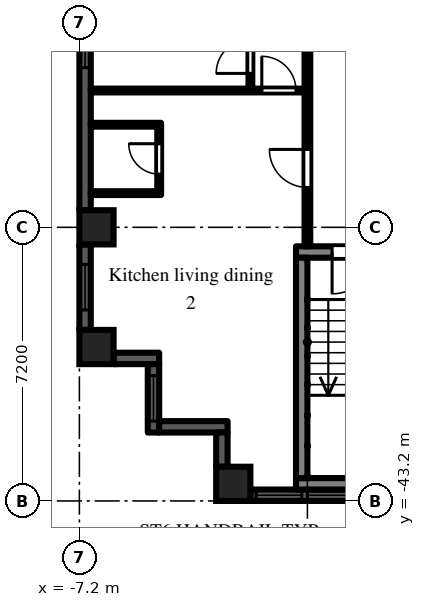
"""IFC4 building model, lengths in metres.
Left out: names, types, materials, properties, quantities, classifications, styles, units other than length and angle.
Written with IfcOpenShell. Run it as: python <this file> out.ifc"""

import sys

from ifc_helpers import new_model, si_unit, direction, frame, frame_2d, origin, origin_2d, place, context, subcontext, project, spatial, rectangle, extrude, element, fill, save


model = new_model("IFC4")
c1 = context("Model", 3, precision=1e-05, world=origin(), true_north=direction((0.0, 1.0)))
c2 = subcontext(c1, "Body", "Model", "MODEL_VIEW")
j1 = project(units=[si_unit("LENGTHUNIT", "METRE"), si_unit("PLANEANGLEUNIT", "RADIAN")], contexts=[c1])
p1 = place(None, origin())
s1 = spatial("IfcSite", under=j1, at=p1, CompositionType="ELEMENT")
p2 = place(p1, origin())
s2 = spatial("IfcBuilding", under=s1, at=p2, CompositionType="ELEMENT")
p3 = place(p2, frame((0.0, 0.0, 108.9)))
s3 = spatial("IfcBuildingStorey", under=s2, at=p3, CompositionType="ELEMENT", Elevation=108.9)
for number, where, z_axis, x_axis in (
    (1, (-6.75, -39.15, 0.0), (0.0, 0.0, 1.0), (1.0, 0.0, 0.0)),
    (2, (-6.75, -36.0, 0.0), (0.0, 0.0, 1.0), (1.0, 0.0, 0.0)),
    (3, (-3.15, -42.75, 0.0), (0.0, 0.0, 1.0), (1.0, 0.0, 0.0)),
):
    element("IfcColumn", number, at=place(p3, frame(where, z_axis=z_axis, x_axis=x_axis)), inside=s3, PredefinedType="COLUMN", context=c2, shape_type="SweptSolid", body=[
        extrude(rectangle(XDim=0.9, YDim=0.9, at=origin_2d()), origin(), (0.0, 0.0, 1.0), 3.0),
    ])
p4 = place(p3, frame((-7.05, -29.25, 0.0), z_axis=(0.0, 0.0, 1.0), x_axis=(0.0, -1.0, 0.0)))
e4 = element("IfcWall", 4, at=p4, inside=s3, PredefinedType="SOLIDWALL", context=c2, shape_type="SweptSolid", body=[
    extrude(rectangle(XDim=6.3, YDim=0.3, at=frame_2d((3.15, 0.0))), origin(), (0.0, 0.0, 1.0), 2.2),
])
p5 = place(p4, frame((0.15, 0.0, 0.2)))
e5 = element("IfcOpeningElement", 5, at=p5, cuts=e4, PredefinedType="OPENING", context=c2, shape_type="SweptSolid", body=[
    extrude(rectangle(XDim=2.4, YDim=1.85, at=frame_2d((1.2, 0.925))), frame((0.0, 0.16, 0.0), z_axis=(0.0, -1.0, 0.0), x_axis=(1.0, 0.0, 0.0)), (0.0, 0.0, 1.0), 0.32),
])
p6 = place(p3, frame((-7.05, -36.45, 0.0), z_axis=(0.0, 0.0, 1.0), x_axis=(0.0, -1.0, 0.0)))
e6 = element("IfcWall", 6, at=p6, inside=s3, PredefinedType="SOLIDWALL", context=c2, shape_type="SweptSolid", body=[
    extrude(rectangle(XDim=2.25, YDim=0.3, at=frame_2d((1.125, 0.0))), origin(), (0.0, 0.0, 1.0), 2.2),
])
p7 = place(p6, frame((0.525, 0.0, 0.2)))
e7 = element("IfcOpeningElement", 7, at=p7, cuts=e6, PredefinedType="OPENING", context=c2, shape_type="SweptSolid", body=[
    extrude(rectangle(XDim=1.2, YDim=1.85, at=frame_2d((0.6, 0.925))), frame((0.0, 0.16, 0.0), z_axis=(0.0, -1.0, 0.0), x_axis=(1.0, 0.0, 0.0)), (0.0, 0.0, 1.0), 0.32),
])
p8 = place(p3, frame((-6.3, -39.45, 0.0), z_axis=(0.0, 0.0, 1.0), x_axis=(1.0, 0.0, 0.0)))
e8 = element("IfcWall", 8, at=p8, inside=s3, PredefinedType="SOLIDWALL", context=c2, shape_type="SweptSolid", body=[
    extrude(rectangle(XDim=1.2, YDim=0.3, at=frame_2d((0.6, 0.0))), origin(), (0.0, 0.0, 1.0), 2.55),
])
p9 = place(p3, frame((-5.25, -39.6, 0.0), z_axis=(0.0, 0.0, 1.0), x_axis=(0.0, -1.0, 0.0)))
e9 = element("IfcWall", 9, at=p9, inside=s3, PredefinedType="SOLIDWALL", context=c2, shape_type="SweptSolid", body=[
    extrude(rectangle(XDim=1.8, YDim=0.3, at=frame_2d((0.9, 0.0))), origin(), (0.0, 0.0, 1.0), 2.55),
])
p10 = place(p9, frame((0.3, 0.0, 0.2)))
e10 = element("IfcOpeningElement", 10, at=p10, cuts=e9, PredefinedType="OPENING", context=c2, shape_type="SweptSolid", body=[
    extrude(rectangle(XDim=1.2, YDim=1.85, at=frame_2d((0.6, 0.925))), frame((0.0, 0.16, 0.0), z_axis=(0.0, -1.0, 0.0), x_axis=(1.0, 0.0, 0.0)), (0.0, 0.0, 1.0), 0.32),
])
p11 = place(p3, frame((-5.1, -41.25, 0.0), z_axis=(0.0, 0.0, 1.0), x_axis=(1.0, 0.0, 0.0)))
e11 = element("IfcWall", 11, at=p11, inside=s3, PredefinedType="SOLIDWALL", context=c2, shape_type="SweptSolid", body=[
    extrude(rectangle(XDim=1.8, YDim=0.3, at=frame_2d((0.9, 0.0))), origin(), (0.0, 0.0, 1.0), 2.55),
])
p12 = place(p3, frame((-3.45, -41.4, 0.0), z_axis=(0.0, 0.0, 1.0), x_axis=(0.0, -1.0, 0.0)))
e12 = element("IfcWall", 12, at=p12, inside=s3, PredefinedType="SOLIDWALL", context=c2, shape_type="SweptSolid", body=[
    extrude(rectangle(XDim=0.9, YDim=0.3, at=frame_2d((0.45, 0.0))), origin(), (0.0, 0.0, 1.0), 2.55),
])
p13 = place(p3, frame((-2.7, -43.05, 0.0), z_axis=(0.0, 0.0, 1.0), x_axis=(1.0, 0.0, 0.0)))
e13 = element("IfcWall", 13, at=p13, inside=s3, PredefinedType="SOLIDWALL", context=c2, shape_type="SweptSolid", body=[
    extrude(rectangle(XDim=5.4, YDim=0.3, at=frame_2d((2.7, 0.0))), origin(), (0.0, 0.0, 1.0), 2.2),
])
p14 = place(p13, frame((1.5, 0.0, 0.2)))
e14 = element("IfcOpeningElement", 14, at=p14, cuts=e13, PredefinedType="OPENING", context=c2, shape_type="SweptSolid", body=[
    extrude(rectangle(XDim=2.4, YDim=1.85, at=frame_2d((1.2, 0.925))), frame((0.0, 0.16, 0.0), z_axis=(0.0, -1.0, 0.0), x_axis=(1.0, 0.0, 0.0)), (0.0, 0.0, 1.0), 0.32),
])
p15 = place(p13, frame((0.15, 0.0, 0.2)))
e15 = element("IfcOpeningElement", 15, at=p15, cuts=e13, PredefinedType="OPENING", context=c2, shape_type="SweptSolid", body=[
    extrude(rectangle(XDim=1.2, YDim=1.85, at=frame_2d((0.6, 0.925))), frame((0.0, 0.16, 0.0), z_axis=(0.0, -1.0, 0.0), x_axis=(1.0, 0.0, 0.0)), (0.0, 0.0, 1.0), 0.32),
])
p16 = place(p13, frame((4.05, 0.0, 0.2)))
e16 = element("IfcOpeningElement", 16, at=p16, cuts=e13, PredefinedType="OPENING", context=c2, shape_type="SweptSolid", body=[
    extrude(rectangle(XDim=1.2, YDim=1.85, at=frame_2d((0.6, 0.925))), frame((0.0, 0.16, 0.0), z_axis=(0.0, -1.0, 0.0), x_axis=(1.0, 0.0, 0.0)), (0.0, 0.0, 1.0), 0.32),
])
p17 = place(p3, frame((-1.5, -36.65, 0.0), z_axis=(0.0, 0.0, 1.0), x_axis=(1.0, 0.0, 0.0)))
e17 = element("IfcWall", 17, at=p17, inside=s3, PredefinedType="SHEAR", context=c2, shape_type="SweptSolid", body=[
    extrude(rectangle(XDim=3.0, YDim=0.3, at=frame_2d((1.5, 0.0))), origin(), (0.0, 0.0, 1.0), 2.55),
])
p18 = place(p17, frame((0.95, 0.0, 0.0)))
e18 = element("IfcOpeningElement", 18, at=p18, cuts=e17, PredefinedType="OPENING", context=c2, shape_type="SweptSolid", body=[
    extrude(rectangle(XDim=1.1, YDim=2.1, at=frame_2d((0.55, 1.05))), frame((0.0, 0.16, 0.0), z_axis=(0.0, -1.0, 0.0), x_axis=(1.0, 0.0, 0.0)), (0.0, 0.0, 1.0), 0.32),
])
p19 = place(p3, frame((-1.5, -42.75, 0.0), z_axis=(0.0, 0.0, 1.0), x_axis=(1.0, 0.0, 0.0)))
e19 = element("IfcWall", 19, at=p19, inside=s3, PredefinedType="SHEAR", context=c2, shape_type="SweptSolid", body=[
    extrude(rectangle(XDim=3.0, YDim=0.3, at=frame_2d((1.5, 0.0))), origin(), (0.0, 0.0, 1.0), 2.55),
])
p20 = place(p3, frame((-1.35, -36.8, 0.0), z_axis=(0.0, 0.0, 1.0), x_axis=(0.0, -1.0, 0.0)))
e20 = element("IfcWall", 20, at=p20, inside=s3, PredefinedType="SHEAR", context=c2, shape_type="SweptSolid", body=[
    extrude(rectangle(XDim=5.8, YDim=0.3, at=frame_2d((2.9, 0.0))), origin(), (0.0, 0.0, 1.0), 2.55),
])
for number, where, z_axis, x_axis in (
    (21, (-6.9, -35.1, 0.0), (0.0, 0.0, 1.0), (1.0, 0.0, 0.0)),
    (22, (-6.9, -33.3, 0.0), (0.0, 0.0, 1.0), (1.0, 0.0, 0.0)),
):
    element("IfcWall", number, at=place(p3, frame(where, z_axis=z_axis, x_axis=x_axis)), inside=s3, PredefinedType="PARTITIONING", context=c2, shape_type="SweptSolid", body=[
        extrude(rectangle(XDim=1.85, YDim=0.1, at=frame_2d((0.925, 0.0))), origin(), (0.0, 0.0, 1.0), 2.55),
    ])
p21 = place(p3, frame((-6.9, -32.4, 0.0), z_axis=(0.0, 0.0, 1.0), x_axis=(1.0, 0.0, 0.0)))
e23 = element("IfcWall", 23, at=p21, inside=s3, PredefinedType="PARTITIONING", context=c2, shape_type="SweptSolid", body=[
    extrude(rectangle(XDim=5.625, YDim=0.1, at=frame_2d((2.812, 0.0))), origin(), (0.0, 0.0, 1.0), 2.55),
])
p22 = place(p21, frame((4.5, 0.0, 0.0)))
e24 = element("IfcOpeningElement", 24, at=p22, cuts=e23, PredefinedType="OPENING", context=c2, shape_type="SweptSolid", body=[
    extrude(rectangle(XDim=0.9, YDim=2.1, at=frame_2d((0.45, 1.05))), frame((0.0, 0.06, 0.0), z_axis=(0.0, -1.0, 0.0), x_axis=(1.0, 0.0, 0.0)), (0.0, 0.0, 1.0), 0.12),
])
p23 = place(p3, frame((-5.1, -35.05, 0.0), z_axis=(0.0, 0.0, 1.0), x_axis=(0.0, 1.0, 0.0)))
e25 = element("IfcWall", 25, at=p23, inside=s3, PredefinedType="PARTITIONING", context=c2, shape_type="SweptSolid", body=[
    extrude(rectangle(XDim=1.7, YDim=0.1, at=frame_2d((0.85, 0.0))), origin(), (0.0, 0.0, 1.0), 2.55),
])
p24 = place(p23, frame((0.45, 0.0, 0.0)))
e26 = element("IfcOpeningElement", 26, at=p24, cuts=e25, PredefinedType="OPENING", context=c2, shape_type="SweptSolid", body=[
    extrude(rectangle(XDim=0.8, YDim=2.1, at=frame_2d((0.4, 1.05))), frame((0.0, 0.06, 0.0), z_axis=(0.0, -1.0, 0.0), x_axis=(1.0, 0.0, 0.0)), (0.0, 0.0, 1.0), 0.12),
])
p25 = place(p3, frame((-2.7, -32.35, 0.0), z_axis=(0.0, 0.0, 1.0), x_axis=(0.0, 1.0, 0.0)))
e27 = element("IfcWall", 27, at=p25, inside=s3, PredefinedType="PARTITIONING", context=c2, shape_type="SweptSolid", body=[
    extrude(rectangle(XDim=14.275, YDim=0.1, at=frame_2d((7.138, 0.0))), origin(), (0.0, 0.0, 1.0), 2.55),
])
p26 = place(p25, frame((0.4, 0.0, 0.0)))
e28 = element("IfcOpeningElement", 28, at=p26, cuts=e27, PredefinedType="OPENING", context=c2, shape_type="SweptSolid", body=[
    extrude(rectangle(XDim=0.9, YDim=2.1, at=frame_2d((0.45, 1.05))), frame((0.0, 0.06, 0.0), z_axis=(0.0, -1.0, 0.0), x_axis=(1.0, 0.0, 0.0)), (0.0, 0.0, 1.0), 0.12),
])
p27 = place(p25, frame((5.8, 0.0, 0.0)))
e29 = element("IfcOpeningElement", 29, at=p27, cuts=e27, PredefinedType="OPENING", context=c2, shape_type="SweptSolid", body=[
    extrude(rectangle(XDim=0.9, YDim=2.1, at=frame_2d((0.45, 1.05))), frame((0.0, 0.06, 0.0), z_axis=(0.0, -1.0, 0.0), x_axis=(1.0, 0.0, 0.0)), (0.0, 0.0, 1.0), 0.12),
])
p28 = place(p25, frame((7.6, 0.0, 0.0)))
e30 = element("IfcOpeningElement", 30, at=p28, cuts=e27, PredefinedType="OPENING", context=c2, shape_type="SweptSolid", body=[
    extrude(rectangle(XDim=0.9, YDim=2.1, at=frame_2d((0.45, 1.05))), frame((0.0, 0.06, 0.0), z_axis=(0.0, -1.0, 0.0), x_axis=(1.0, 0.0, 0.0)), (0.0, 0.0, 1.0), 0.12),
])
p29 = place(p25, frame((13.0, 0.0, 0.0)))
e31 = element("IfcOpeningElement", 31, at=p29, cuts=e27, PredefinedType="OPENING", context=c2, shape_type="SweptSolid", body=[
    extrude(rectangle(XDim=0.9, YDim=2.1, at=frame_2d((0.45, 1.05))), frame((0.0, 0.06, 0.0), z_axis=(0.0, -1.0, 0.0), x_axis=(1.0, 0.0, 0.0)), (0.0, 0.0, 1.0), 0.12),
])
p30 = place(p3, frame((-1.2, -36.5, 0.0), z_axis=(0.0, 0.0, 1.0), x_axis=(0.0, 1.0, 0.0)))
e32 = element("IfcWall", 32, at=p30, inside=s3, PredefinedType="PARTITIONING", context=c2, shape_type="SweptSolid", body=[
    extrude(rectangle(XDim=35.225, YDim=0.15, at=frame_2d((17.613, 0.0))), origin(), (0.0, 0.0, 1.0), 2.55),
])
p31 = place(p30, frame((31.85, 0.0, 0.0)))
e33 = element("IfcOpeningElement", 33, at=p31, cuts=e32, PredefinedType="OPENING", context=c2, shape_type="SweptSolid", body=[
    extrude(rectangle(XDim=0.9, YDim=2.1, at=frame_2d((0.45, 1.05))), frame((0.0, 0.085, 0.0), z_axis=(0.0, -1.0, 0.0), x_axis=(1.0, 0.0, 0.0)), (0.0, 0.0, 1.0), 0.17),
])
p32 = place(p30, frame((27.05, 0.0, 0.0)))
e34 = element("IfcOpeningElement", 34, at=p32, cuts=e32, PredefinedType="OPENING", context=c2, shape_type="SweptSolid", body=[
    extrude(rectangle(XDim=0.9, YDim=2.1, at=frame_2d((0.45, 1.05))), frame((0.0, 0.085, 0.0), z_axis=(0.0, -1.0, 0.0), x_axis=(1.0, 0.0, 0.0)), (0.0, 0.0, 1.0), 0.17),
])
p33 = place(p30, frame((20.75, 0.0, 0.0)))
e35 = element("IfcOpeningElement", 35, at=p33, cuts=e32, PredefinedType="OPENING", context=c2, shape_type="SweptSolid", body=[
    extrude(rectangle(XDim=0.9, YDim=2.1, at=frame_2d((0.45, 1.05))), frame((0.0, 0.085, 0.0), z_axis=(0.0, -1.0, 0.0), x_axis=(1.0, 0.0, 0.0)), (0.0, 0.0, 1.0), 0.17),
])
p34 = place(p30, frame((18.95, 0.0, 0.0)))
e36 = element("IfcOpeningElement", 36, at=p34, cuts=e32, PredefinedType="OPENING", context=c2, shape_type="SweptSolid", body=[
    extrude(rectangle(XDim=0.9, YDim=2.1, at=frame_2d((0.45, 1.05))), frame((0.0, 0.085, 0.0), z_axis=(0.0, -1.0, 0.0), x_axis=(1.0, 0.0, 0.0)), (0.0, 0.0, 1.0), 0.17),
])
p35 = place(p30, frame((1.55, 0.0, 0.0)))
e37 = element("IfcOpeningElement", 37, at=p35, cuts=e32, PredefinedType="OPENING", context=c2, shape_type="SweptSolid", body=[
    extrude(rectangle(XDim=1.0, YDim=2.1, at=frame_2d((0.5, 1.05))), frame((0.0, 0.085, 0.0), z_axis=(0.0, -1.0, 0.0), x_axis=(1.0, 0.0, 0.0)), (0.0, 0.0, 1.0), 0.17),
])
p36 = place(p5, origin())
e38 = element("IfcWindow", 38, at=p36, inside=s3, PartitioningType="SINGLE_PANEL", PredefinedType="WINDOW", context=c2, shape_type="SweptSolid", body=[
    extrude(rectangle(XDim=2.4, YDim=1.85, at=frame_2d((1.2, 0.925))), frame((0.0, 0.03, 0.0), z_axis=(0.0, -1.0, 0.0), x_axis=(1.0, 0.0, 0.0)), (0.0, 0.0, 1.0), 0.06),
])
fill(e5, e38)
p37 = place(p7, origin())
e39 = element("IfcWindow", 39, at=p37, inside=s3, PartitioningType="SINGLE_PANEL", PredefinedType="WINDOW", context=c2, shape_type="SweptSolid", body=[
    extrude(rectangle(XDim=1.2, YDim=1.85, at=frame_2d((0.6, 0.925))), frame((0.0, 0.03, 0.0), z_axis=(0.0, -1.0, 0.0), x_axis=(1.0, 0.0, 0.0)), (0.0, 0.0, 1.0), 0.06),
])
fill(e7, e39)
p38 = place(p10, origin())
e40 = element("IfcWindow", 40, at=p38, inside=s3, PartitioningType="SINGLE_PANEL", PredefinedType="WINDOW", context=c2, shape_type="SweptSolid", body=[
    extrude(rectangle(XDim=1.2, YDim=1.85, at=frame_2d((0.6, 0.925))), frame((0.0, 0.03, 0.0), z_axis=(0.0, -1.0, 0.0), x_axis=(1.0, 0.0, 0.0)), (0.0, 0.0, 1.0), 0.06),
])
fill(e10, e40)
p39 = place(p14, origin())
e41 = element("IfcWindow", 41, at=p39, inside=s3, PartitioningType="SINGLE_PANEL", PredefinedType="WINDOW", context=c2, shape_type="SweptSolid", body=[
    extrude(rectangle(XDim=2.4, YDim=1.85, at=frame_2d((1.2, 0.925))), frame((0.0, 0.03, 0.0), z_axis=(0.0, -1.0, 0.0), x_axis=(1.0, 0.0, 0.0)), (0.0, 0.0, 1.0), 0.06),
])
fill(e14, e41)
p40 = place(p15, origin())
e42 = element("IfcWindow", 42, at=p40, inside=s3, PartitioningType="SINGLE_PANEL", PredefinedType="WINDOW", context=c2, shape_type="SweptSolid", body=[
    extrude(rectangle(XDim=1.2, YDim=1.85, at=frame_2d((0.6, 0.925))), frame((0.0, 0.03, 0.0), z_axis=(0.0, -1.0, 0.0), x_axis=(1.0, 0.0, 0.0)), (0.0, 0.0, 1.0), 0.06),
])
fill(e15, e42)
p41 = place(p18, frame((1.1, 0.0, 0.0), z_axis=(0.0, 0.0, 1.0), x_axis=(-1.0, 0.0, 0.0)))
e43 = element("IfcDoor", 43, at=p41, inside=s3, OperationType="SINGLE_SWING_RIGHT", PredefinedType="DOOR", context=c2, shape_type="SweptSolid", body=[
    extrude(rectangle(XDim=1.1, YDim=2.1, at=frame_2d((0.55, 1.05))), frame((0.0, 0.025, 0.0), z_axis=(0.0, -1.0, 0.0), x_axis=(1.0, 0.0, 0.0)), (0.0, 0.0, 1.0), 0.05),
])
fill(e18, e43)
p42 = place(p24, origin())
e44 = element("IfcDoor", 44, at=p42, inside=s3, OperationType="SINGLE_SWING_RIGHT", PredefinedType="DOOR", context=c2, shape_type="SweptSolid", body=[
    extrude(rectangle(XDim=0.8, YDim=2.1, at=frame_2d((0.4, 1.05))), frame((0.0, 0.025, 0.0), z_axis=(0.0, -1.0, 0.0), x_axis=(1.0, 0.0, 0.0)), (0.0, 0.0, 1.0), 0.05),
])
fill(e26, e44)
p43 = place(p35, origin())
e45 = element("IfcDoor", 45, at=p43, inside=s3, OperationType="SINGLE_SWING_RIGHT", PredefinedType="DOOR", context=c2, shape_type="SweptSolid", body=[
    extrude(rectangle(XDim=1.0, YDim=2.1, at=frame_2d((0.5, 1.05))), frame((0.0, 0.025, 0.0), z_axis=(0.0, -1.0, 0.0), x_axis=(1.0, 0.0, 0.0)), (0.0, 0.0, 1.0), 0.05),
])
fill(e37, e45)
p44 = place(p26, origin())
e46 = element("IfcDoor", 46, at=p44, inside=s3, OperationType="SINGLE_SWING_LEFT", PredefinedType="DOOR", context=c2, shape_type="SweptSolid", body=[
    extrude(rectangle(XDim=0.9, YDim=2.1, at=frame_2d((0.45, 1.05))), frame((0.0, 0.025, 0.0), z_axis=(0.0, -1.0, 0.0), x_axis=(1.0, 0.0, 0.0)), (0.0, 0.0, 1.0), 0.05),
])
fill(e28, e46)
p45 = place(p22, origin())
e47 = element("IfcDoor", 47, at=p45, inside=s3, OperationType="SINGLE_SWING_LEFT", PredefinedType="DOOR", context=c2, shape_type="SweptSolid", body=[
    extrude(rectangle(XDim=0.9, YDim=2.1, at=frame_2d((0.45, 1.05))), frame((0.0, 0.025, 0.0), z_axis=(0.0, -1.0, 0.0), x_axis=(1.0, 0.0, 0.0)), (0.0, 0.0, 1.0), 0.05),
])
fill(e24, e47)
save(model, sys.argv[1])
